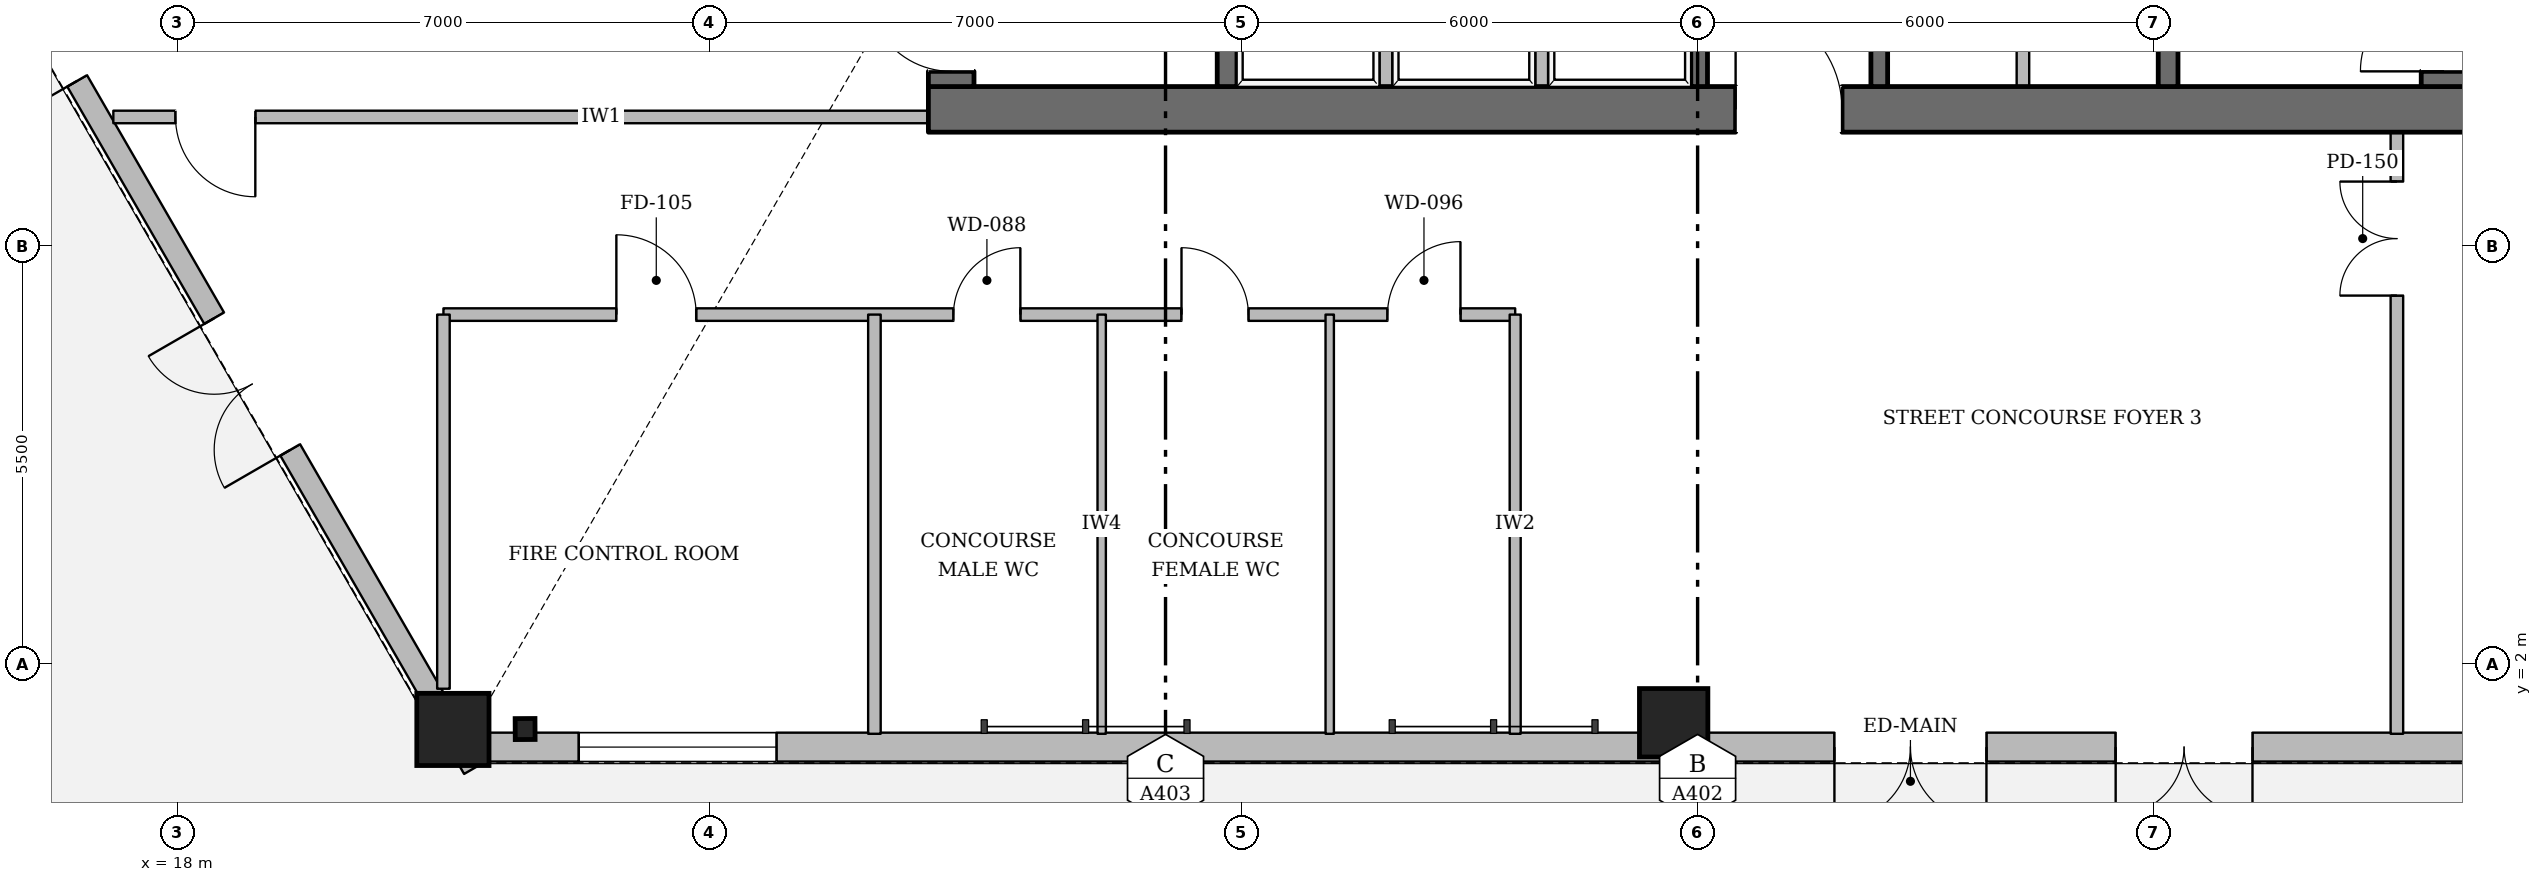
"""IFC4 building model, lengths in metres.
Left out: names, types, materials, properties, quantities, classifications, styles, units other than length and angle.
Written with IfcOpenShell. Run it as: python <this file> out.ifc"""

import sys

from ifc_helpers import new_model, si_unit, direction, frame, frame_2d, origin, origin_2d, place, context, subcontext, project, spatial, rectangle, hollow_rectangle, i_section, extrude, element, fill, save


model = new_model("IFC4")
c1 = context("Model", 3, precision=1e-05, world=origin(), true_north=direction((0.0, 1.0)))
c2 = subcontext(c1, "Body", "Model", "MODEL_VIEW")
j1 = project(units=[si_unit("LENGTHUNIT", "METRE"), si_unit("PLANEANGLEUNIT", "RADIAN")], contexts=[c1])
p1 = place(None, origin())
s1 = spatial("IfcSite", under=j1, at=p1, CompositionType="ELEMENT")
p2 = place(p1, origin())
s2 = spatial("IfcBuilding", under=s1, at=p2, CompositionType="ELEMENT")
p3 = place(p2, origin())
s3 = spatial("IfcBuildingStorey", under=s2, at=p3, CompositionType="ELEMENT", Elevation=0.0)
p4 = place(p3, frame((27.88, 9.3, 0.0), z_axis=(0.0, 0.0, 1.0), x_axis=(1.0, 0.0, 0.0)))
e1 = element("IfcWall", 1, at=p4, inside=s3, PredefinedType="SOLIDWALL", context=c2, shape_type="SweptSolid", body=[
    extrude(rectangle(XDim=20.24, YDim=0.6, at=frame_2d((10.12, 0.0))), origin(), (0.0, 0.0, 1.0), 5.74),
])
p5 = place(p4, frame((10.62, 0.0, 0.0)))
e2 = element("IfcOpeningElement", 2, at=p5, cuts=e1, PredefinedType="OPENING", context=c2, shape_type="SweptSolid", body=[
    extrude(rectangle(XDim=1.4, YDim=2.2, at=frame_2d((0.7, 1.1))), frame((0.0, 0.31, 0.0), z_axis=(0.0, -1.0, 0.0), x_axis=(1.0, 0.0, 0.0)), (0.0, 0.0, 1.0), 0.62),
])
p6 = place(p3, frame((28.18, 9.6, 0.0), z_axis=(0.0, 0.0, 1.0), x_axis=(0.0, 1.0, 0.0)))
e3 = element("IfcWall", 3, at=p6, inside=s3, PredefinedType="SOLIDWALL", context=c2, shape_type="SweptSolid", body=[
    extrude(rectangle(XDim=13.0, YDim=0.6, at=frame_2d((6.5, 0.0))), origin(), (0.0, 0.0, 1.0), 5.74),
])
p7 = place(p6, frame((8.4, 0.0, 0.0)))
e4 = element("IfcOpeningElement", 4, at=p7, cuts=e3, PredefinedType="OPENING", context=c2, shape_type="SweptSolid", body=[
    extrude(rectangle(XDim=0.9, YDim=2.1, at=frame_2d((0.45, 1.05))), frame((0.0, 0.31, 0.0), z_axis=(0.0, -1.0, 0.0), x_axis=(1.0, 0.0, 0.0)), (0.0, 0.0, 1.0), 0.62),
])
p8 = place(p6, frame((0.2, 0.0, 0.0)))
e5 = element("IfcOpeningElement", 5, at=p8, cuts=e3, PredefinedType="OPENING", context=c2, shape_type="SweptSolid", body=[
    extrude(rectangle(XDim=1.1, YDim=2.15, at=frame_2d((0.55, 1.075))), frame((0.0, 0.31, 0.0), z_axis=(0.0, -1.0, 0.0), x_axis=(1.0, 0.0, 0.0)), (0.0, 0.0, 1.0), 0.62),
])
p9 = place(p3, frame((47.82, 9.6, 0.0), z_axis=(0.0, 0.0, 1.0), x_axis=(0.0, 1.0, 0.0)))
e6 = element("IfcWall", 6, at=p9, inside=s3, PredefinedType="SOLIDWALL", context=c2, shape_type="SweptSolid", body=[
    extrude(rectangle(XDim=13.0, YDim=0.6, at=frame_2d((6.5, 0.0))), origin(), (0.0, 0.0, 1.0), 5.74),
])
p10 = place(p9, frame((8.4, 0.0, 0.0)))
e7 = element("IfcOpeningElement", 7, at=p10, cuts=e6, PredefinedType="OPENING", context=c2, shape_type="SweptSolid", body=[
    extrude(rectangle(XDim=0.9, YDim=2.1, at=frame_2d((0.45, 1.05))), frame((0.0, 0.31, 0.0), z_axis=(0.0, -1.0, 0.0), x_axis=(1.0, 0.0, 0.0)), (0.0, 0.0, 1.0), 0.62),
])
p11 = place(p9, frame((0.2, 0.0, 0.0)))
e8 = element("IfcOpeningElement", 8, at=p11, cuts=e6, PredefinedType="OPENING", context=c2, shape_type="SweptSolid", body=[
    extrude(rectangle(XDim=1.1, YDim=2.15, at=frame_2d((0.55, 1.075))), frame((0.0, 0.31, 0.0), z_axis=(0.0, -1.0, 0.0), x_axis=(1.0, 0.0, 0.0)), (0.0, 0.0, 1.0), 0.62),
])
p12 = place(p3, frame((31.81, 9.6, 0.0), z_axis=(0.0, 0.0, 1.0), x_axis=(0.0, 1.0, 0.0)))
e9 = element("IfcWall", 9, at=p12, inside=s3, PredefinedType="SHEAR", context=c2, shape_type="SweptSolid", body=[
    extrude(rectangle(XDim=13.0, YDim=0.26, at=frame_2d((6.5, 0.0))), origin(), (0.0, 0.0, 1.0), 5.74),
])
p13 = place(p12, frame((10.925, 0.0, 0.0)))
e10 = element("IfcOpeningElement", 10, at=p13, cuts=e9, PredefinedType="OPENING", context=c2, shape_type="SweptSolid", body=[
    extrude(rectangle(XDim=1.25, YDim=2.25, at=frame_2d((0.625, 1.125))), frame((0.0, 0.14, 0.0), z_axis=(0.0, -1.0, 0.0), x_axis=(1.0, 0.0, 0.0)), (0.0, 0.0, 1.0), 0.28),
])
p14 = place(p3, frame((44.19, 9.6, 0.0), z_axis=(0.0, 0.0, 1.0), x_axis=(0.0, 1.0, 0.0)))
e11 = element("IfcWall", 11, at=p14, inside=s3, PredefinedType="SHEAR", context=c2, shape_type="SweptSolid", body=[
    extrude(rectangle(XDim=13.0, YDim=0.26, at=frame_2d((6.5, 0.0))), origin(), (0.0, 0.0, 1.0), 5.74),
])
p15 = place(p14, frame((10.925, 0.0, 0.0)))
e12 = element("IfcOpeningElement", 12, at=p15, cuts=e11, PredefinedType="OPENING", context=c2, shape_type="SweptSolid", body=[
    extrude(rectangle(XDim=1.25, YDim=2.25, at=frame_2d((0.625, 1.125))), frame((0.0, 0.14, 0.0), z_axis=(0.0, -1.0, 0.0), x_axis=(1.0, 0.0, 0.0)), (0.0, 0.0, 1.0), 0.28),
])
for number, where, z_axis, x_axis in (
    (13, (38.02, 9.6, 0.0), (0.0, 0.0, 1.0), (0.0, 1.0, 0.0)),
    (14, (40.39, 9.6, 0.0), (0.0, 0.0, 1.0), (0.0, 1.0, 0.0)),
):
    element("IfcWall", number, at=place(p3, frame(where, z_axis=z_axis, x_axis=x_axis)), inside=s3, PredefinedType="SOLIDWALL", context=c2, shape_type="SweptSolid", body=[
        extrude(rectangle(XDim=2.24, YDim=0.22, at=frame_2d((1.12, 0.0))), origin(), (0.0, 0.0, 1.0), 5.74),
    ])
p16 = place(p3, frame((21.625, 1.142, 0.0), z_axis=(0.0, 0.0, 1.0), x_axis=(1.0, 0.0, 0.0)))
e15 = element("IfcColumn", 15, at=p16, inside=s3, PredefinedType="COLUMN", context=c2, shape_type="SweptSolid", body=[
    extrude(hollow_rectangle(XDim=0.95, YDim=0.95, WallThickness=0.04, at=origin_2d()), origin(), (0.0, 0.0, 1.0), 5.74),
])
p17 = place(p3, frame((37.685, 1.23, 0.0), z_axis=(0.0, 0.0, 1.0), x_axis=(1.0, 0.0, 0.0)))
e16 = element("IfcColumn", 16, at=p17, inside=s3, PredefinedType="COLUMN", context=c2, shape_type="SweptSolid", body=[
    extrude(hollow_rectangle(XDim=0.9, YDim=0.9, WallThickness=0.038, at=origin_2d()), origin(), (0.0, 0.0, 1.0), 5.74),
])
p18 = place(p3, frame((22.574, 1.148, 0.0), z_axis=(0.0, 0.0, 1.0), x_axis=(0.999985363169, 0.005410494284, 0.0)))
e17 = element("IfcColumn", 17, at=p18, inside=s3, PredefinedType="PILASTER", context=c2, shape_type="SweptSolid", body=[
    extrude(i_section(OverallWidth=0.261, OverallDepth=0.276, WebThickness=0.015, FlangeThickness=0.025, at=origin_2d()), origin(), (0.0, 0.0, 1.0), 5.74),
])
p19 = place(p3, frame((21.902, 0.632, 0.0), z_axis=(0.0, 0.0, 1.0), x_axis=(-0.500005062714, 0.866022480806, 0.0)))
e18 = element("IfcWall", 18, at=p19, inside=s3, PredefinedType="STANDARD", context=c2, shape_type="SweptSolid", body=[
    extrude(rectangle(XDim=17.448, YDim=0.3, at=frame_2d((8.724, 0.0))), origin(), (0.0, 0.0, 1.0), 3.43),
])
p20 = place(p19, frame((10.442, 0.0, 0.0)))
e19 = element("IfcOpeningElement", 19, at=p20, cuts=e18, PredefinedType="OPENING", context=c2, shape_type="SweptSolid", body=[
    extrude(rectangle(XDim=1.8, YDim=2.25, at=frame_2d((0.9, 1.125))), frame((0.0, 0.16, 0.0), z_axis=(0.0, -1.0, 0.0), x_axis=(1.0, 0.0, 0.0)), (0.0, 0.0, 1.0), 0.32),
])
p21 = place(p19, frame((4.836, 0.0, 0.0)))
e20 = element("IfcOpeningElement", 20, at=p21, cuts=e18, PredefinedType="OPENING", context=c2, shape_type="SweptSolid", body=[
    extrude(rectangle(XDim=2.0, YDim=2.6, at=frame_2d((1.0, 1.3))), frame((0.0, 0.16, 0.0), z_axis=(0.0, -1.0, 0.0), x_axis=(1.0, 0.0, 0.0)), (0.0, 0.0, 1.0), 0.32),
])
p22 = place(p3, frame((54.58, 0.91, 0.0), z_axis=(0.0, 0.0, 1.0), x_axis=(-1.0, 0.0, 0.0)))
e21 = element("IfcWall", 21, at=p22, inside=s3, PredefinedType="STANDARD", context=c2, shape_type="SweptSolid", body=[
    extrude(rectangle(XDim=33.16, YDim=0.38, at=frame_2d((16.58, 0.0))), origin(), (0.0, 0.0, 1.0), 3.43),
])
p23 = place(p22, frame((9.28, 0.0, 0.0)))
e22 = element("IfcOpeningElement", 22, at=p23, cuts=e21, PredefinedType="OPENING", context=c2, shape_type="SweptSolid", body=[
    extrude(rectangle(XDim=1.8, YDim=2.25, at=frame_2d((0.9, 1.125))), frame((0.0, 0.2, 0.0), z_axis=(0.0, -1.0, 0.0), x_axis=(1.0, 0.0, 0.0)), (0.0, 0.0, 1.0), 0.4),
])
p24 = place(p22, frame((12.78, 0.0, 0.0)))
e23 = element("IfcOpeningElement", 23, at=p24, cuts=e21, PredefinedType="OPENING", context=c2, shape_type="SweptSolid", body=[
    extrude(rectangle(XDim=2.0, YDim=2.6, at=frame_2d((1.0, 1.3))), frame((0.0, 0.2, 0.0), z_axis=(0.0, -1.0, 0.0), x_axis=(1.0, 0.0, 0.0)), (0.0, 0.0, 1.0), 0.4),
])
p25 = place(p22, frame((28.699, 0.0, 0.55)))
e24 = element("IfcOpeningElement", 24, at=p25, cuts=e21, PredefinedType="OPENING", context=c2, shape_type="SweptSolid", body=[
    extrude(rectangle(XDim=2.6, YDim=2.55, at=frame_2d((1.3, 1.275))), frame((0.0, 0.2, 0.0), z_axis=(0.0, -1.0, 0.0), x_axis=(1.0, 0.0, 0.0)), (0.0, 0.0, 1.0), 0.4),
])
p26 = place(p22, frame((1.861, 0.0, 0.55)))
e25 = element("IfcOpeningElement", 25, at=p26, cuts=e21, PredefinedType="OPENING", context=c2, shape_type="SweptSolid", body=[
    extrude(rectangle(XDim=2.6, YDim=2.55, at=frame_2d((1.3, 1.275))), frame((0.0, 0.2, 0.0), z_axis=(0.0, -1.0, 0.0), x_axis=(1.0, 0.0, 0.0)), (0.0, 0.0, 1.0), 0.4),
])
for number, where, z_axis, x_axis in (
    (26, (33.9, 9.6, 0.0), (0.0, 0.0, 1.0), (0.0, 1.0, 0.0)),
    (27, (35.95, 9.6, 0.0), (0.0, 0.0, 1.0), (0.0, 1.0, 0.0)),
    (28, (42.28, 9.6, 0.0), (0.0, 0.0, 1.0), (0.0, 1.0, 0.0)),
):
    element("IfcWall", number, at=place(p3, frame(where, z_axis=z_axis, x_axis=x_axis)), inside=s3, PredefinedType="PARTITIONING", context=c2, shape_type="SweptSolid", body=[
        extrude(rectangle(XDim=2.24, YDim=0.165, at=frame_2d((1.12, 0.0))), origin(), (0.0, 0.0, 1.0), 5.74),
    ])
p27 = place(p3, frame((27.88, 9.2, 0.0), z_axis=(0.0, 0.0, 1.0), x_axis=(-1.0, 0.0, 0.0)))
e29 = element("IfcWall", 29, at=p27, inside=s3, PredefinedType="PARTITIONING", context=c2, shape_type="SweptSolid", body=[
    extrude(rectangle(XDim=10.723, YDim=0.165, at=frame_2d((5.361, 0.0))), origin(), (0.0, 0.0, 1.0), 5.74),
])
p28 = place(p27, frame((8.855, 0.0, 0.0)))
e30 = element("IfcOpeningElement", 30, at=p28, cuts=e29, PredefinedType="OPENING", context=c2, shape_type="SweptSolid", body=[
    extrude(rectangle(XDim=1.05, YDim=2.15, at=frame_2d((0.525, 1.075))), frame((0.0, 0.093, 0.0), z_axis=(0.0, -1.0, 0.0), x_axis=(1.0, 0.0, 0.0)), (0.0, 0.0, 1.0), 0.185),
])
p29 = place(p3, frame((21.5, 6.6, 0.0), z_axis=(0.0, 0.0, 1.0), x_axis=(1.0, 0.0, 0.0)))
e31 = element("IfcWall", 31, at=p29, inside=s3, PredefinedType="PARTITIONING", context=c2, shape_type="SweptSolid", body=[
    extrude(rectangle(XDim=14.1, YDim=0.165, at=frame_2d((7.05, 0.0))), origin(), (0.0, 0.0, 1.0), 5.428),
])
p30 = place(p29, frame((2.275, 0.0, 0.0)))
e32 = element("IfcOpeningElement", 32, at=p30, cuts=e31, PredefinedType="OPENING", context=c2, shape_type="SweptSolid", body=[
    extrude(rectangle(XDim=1.05, YDim=2.15, at=frame_2d((0.525, 1.075))), frame((0.0, 0.093, 0.0), z_axis=(0.0, -1.0, 0.0), x_axis=(1.0, 0.0, 0.0)), (0.0, 0.0, 1.0), 0.185),
])
p31 = place(p29, frame((6.71, 0.0, 0.0)))
e33 = element("IfcOpeningElement", 33, at=p31, cuts=e31, PredefinedType="OPENING", context=c2, shape_type="SweptSolid", body=[
    extrude(rectangle(XDim=0.88, YDim=2.1, at=frame_2d((0.44, 1.05))), frame((0.0, 0.093, 0.0), z_axis=(0.0, -1.0, 0.0), x_axis=(1.0, 0.0, 0.0)), (0.0, 0.0, 1.0), 0.185),
])
p32 = place(p29, frame((9.71, 0.0, 0.0)))
e34 = element("IfcOpeningElement", 34, at=p32, cuts=e31, PredefinedType="OPENING", context=c2, shape_type="SweptSolid", body=[
    extrude(rectangle(XDim=0.88, YDim=2.1, at=frame_2d((0.44, 1.05))), frame((0.0, 0.093, 0.0), z_axis=(0.0, -1.0, 0.0), x_axis=(1.0, 0.0, 0.0)), (0.0, 0.0, 1.0), 0.185),
])
p33 = place(p29, frame((12.42, 0.0, 0.0)))
e35 = element("IfcOpeningElement", 35, at=p33, cuts=e31, PredefinedType="OPENING", context=c2, shape_type="SweptSolid", body=[
    extrude(rectangle(XDim=0.96, YDim=2.1, at=frame_2d((0.48, 1.05))), frame((0.0, 0.093, 0.0), z_axis=(0.0, -1.0, 0.0), x_axis=(1.0, 0.0, 0.0)), (0.0, 0.0, 1.0), 0.185),
])
p34 = place(p3, frame((21.5, 1.678, 0.0), z_axis=(0.0, 0.0, 1.0), x_axis=(0.0, 1.0, 0.0)))
e36 = element("IfcWall", 36, at=p34, inside=s3, PredefinedType="PARTITIONING", context=c2, shape_type="SweptSolid", body=[
    extrude(rectangle(XDim=4.922, YDim=0.165, at=frame_2d((2.461, 0.0))), origin(), (0.0, 0.0, 1.0), 4.475),
])
p35 = place(p3, frame((27.17, 1.085, 0.0), z_axis=(0.0, 0.0, 1.0), x_axis=(0.0, 1.0, 0.0)))
e37 = element("IfcWall", 37, at=p35, inside=s3, PredefinedType="PARTITIONING", context=c2, shape_type="SweptSolid", body=[
    extrude(rectangle(XDim=5.515, YDim=0.165, at=frame_2d((2.758, 0.0))), origin(), (0.0, 0.0, 1.0), 5.74),
])
for number, where, z_axis, x_axis in (
    (38, (30.16, 1.085, 0.0), (0.0, 0.0, 1.0), (0.0, 1.0, 0.0)),
    (39, (33.16, 1.085, 0.0), (0.0, 0.0, 1.0), (0.0, 1.0, 0.0)),
):
    element("IfcWall", number, at=place(p3, frame(where, z_axis=z_axis, x_axis=x_axis)), inside=s3, PredefinedType="PLUMBINGWALL", context=c2, shape_type="SweptSolid", body=[
        extrude(rectangle(XDim=5.515, YDim=0.11, at=frame_2d((2.758, 0.0))), origin(), (0.0, 0.0, 1.0), 5.74),
    ])
p36 = place(p3, frame((35.6, 1.085, 0.0), z_axis=(0.0, 0.0, 1.0), x_axis=(0.0, 1.0, 0.0)))
e40 = element("IfcWall", 40, at=p36, inside=s3, PredefinedType="PARTITIONING", context=c2, shape_type="SweptSolid", body=[
    extrude(rectangle(XDim=5.515, YDim=0.145, at=frame_2d((2.758, 0.0))), origin(), (0.0, 0.0, 1.0), 5.74),
])
p37 = place(p3, frame((47.2, 1.085, 0.0), z_axis=(0.0, 0.0, 1.0), x_axis=(0.0, 1.0, 0.0)))
e41 = element("IfcWall", 41, at=p37, inside=s3, PredefinedType="PARTITIONING", context=c2, shape_type="SweptSolid", body=[
    extrude(rectangle(XDim=8.035, YDim=0.165, at=frame_2d((4.018, 0.0))), origin(), (0.0, 0.0, 1.0), 5.74),
])
p38 = place(p37, frame((5.765, 0.0, 0.0)))
e42 = element("IfcOpeningElement", 42, at=p38, cuts=e41, PredefinedType="OPENING", context=c2, shape_type="SweptSolid", body=[
    extrude(rectangle(XDim=1.5, YDim=2.25, at=frame_2d((0.75, 1.125))), frame((0.0, 0.093, 0.0), z_axis=(0.0, -1.0, 0.0), x_axis=(1.0, 0.0, 0.0)), (0.0, 0.0, 1.0), 0.185),
])
p39 = place(p20, origin())
e43 = element("IfcDoor", 43, at=p39, inside=s3, OperationType="DOUBLE_DOOR_SINGLE_SWING", PredefinedType="DOOR", context=c2, shape_type="SweptSolid", body=[
    extrude(rectangle(XDim=1.8, YDim=2.25, at=frame_2d((0.9, 1.125))), frame((0.0, 0.025, 0.0), z_axis=(0.0, -1.0, 0.0), x_axis=(1.0, 0.0, 0.0)), (0.0, 0.0, 1.0), 0.05),
])
fill(e19, e43)
p40 = place(p23, origin())
e44 = element("IfcDoor", 44, at=p40, inside=s3, OperationType="DOUBLE_DOOR_SINGLE_SWING", PredefinedType="DOOR", context=c2, shape_type="SweptSolid", body=[
    extrude(rectangle(XDim=1.8, YDim=2.25, at=frame_2d((0.9, 1.125))), frame((0.0, 0.025, 0.0), z_axis=(0.0, -1.0, 0.0), x_axis=(1.0, 0.0, 0.0)), (0.0, 0.0, 1.0), 0.05),
])
fill(e22, e44)
p41 = place(p24, origin())
e45 = element("IfcDoor", 45, at=p41, inside=s3, OperationType="DOUBLE_DOOR_SINGLE_SWING", PredefinedType="DOOR", context=c2, shape_type="SweptSolid", body=[
    extrude(rectangle(XDim=2.0, YDim=2.6, at=frame_2d((1.0, 1.3))), frame((0.0, 0.025, 0.0), z_axis=(0.0, -1.0, 0.0), x_axis=(1.0, 0.0, 0.0)), (0.0, 0.0, 1.0), 0.05),
])
fill(e23, e45)
p42 = place(p21, origin())
e46 = element("IfcDoor", 46, at=p42, inside=s3, OperationType="DOUBLE_DOOR_SINGLE_SWING", PredefinedType="DOOR", context=c2, shape_type="SweptSolid", body=[
    extrude(rectangle(XDim=2.0, YDim=2.6, at=frame_2d((1.0, 1.3))), frame((0.0, 0.025, 0.0), z_axis=(0.0, -1.0, 0.0), x_axis=(1.0, 0.0, 0.0)), (0.0, 0.0, 1.0), 0.05),
])
fill(e20, e46)
p43 = place(p25, origin())
e47 = element("IfcWindow", 47, at=p43, inside=s3, PartitioningType="SINGLE_PANEL", PredefinedType="WINDOW", context=c2, shape_type="SweptSolid", body=[
    extrude(rectangle(XDim=2.6, YDim=2.55, at=frame_2d((1.3, 1.275))), frame((0.0, 0.03, 0.0), z_axis=(0.0, -1.0, 0.0), x_axis=(1.0, 0.0, 0.0)), (0.0, 0.0, 1.0), 0.06),
])
fill(e24, e47)
p44 = place(p5, origin())
e48 = element("IfcDoor", 48, at=p44, inside=s3, OperationType="SINGLE_SWING_LEFT", PredefinedType="DOOR", context=c2, shape_type="SweptSolid", body=[
    extrude(rectangle(XDim=1.4, YDim=2.2, at=frame_2d((0.7, 1.1))), frame((0.0, 0.025, 0.0), z_axis=(0.0, -1.0, 0.0), x_axis=(1.0, 0.0, 0.0)), (0.0, 0.0, 1.0), 0.05),
])
fill(e2, e48)
p45 = place(p8, origin())
e49 = element("IfcDoor", 49, at=p45, inside=s3, OperationType="SINGLE_SWING_RIGHT", PredefinedType="DOOR", context=c2, shape_type="SweptSolid", body=[
    extrude(rectangle(XDim=1.1, YDim=2.15, at=frame_2d((0.55, 1.075))), frame((0.0, 0.025, 0.0), z_axis=(0.0, -1.0, 0.0), x_axis=(1.0, 0.0, 0.0)), (0.0, 0.0, 1.0), 0.05),
])
fill(e5, e49)
p46 = place(p11, origin())
e50 = element("IfcDoor", 50, at=p46, inside=s3, OperationType="SINGLE_SWING_LEFT", PredefinedType="DOOR", context=c2, shape_type="SweptSolid", body=[
    extrude(rectangle(XDim=1.1, YDim=2.15, at=frame_2d((0.55, 1.075))), frame((0.0, 0.025, 0.0), z_axis=(0.0, -1.0, 0.0), x_axis=(1.0, 0.0, 0.0)), (0.0, 0.0, 1.0), 0.05),
])
fill(e8, e50)
p47 = place(p30, origin())
e51 = element("IfcDoor", 51, at=p47, inside=s3, OperationType="SINGLE_SWING_LEFT", PredefinedType="DOOR", context=c2, shape_type="SweptSolid", body=[
    extrude(rectangle(XDim=1.05, YDim=2.15, at=frame_2d((0.525, 1.075))), frame((0.0, 0.025, 0.0), z_axis=(0.0, -1.0, 0.0), x_axis=(1.0, 0.0, 0.0)), (0.0, 0.0, 1.0), 0.05),
])
fill(e32, e51)
p48 = place(p31, origin())
e52 = element("IfcDoor", 52, at=p48, inside=s3, OperationType="SINGLE_SWING_RIGHT", PredefinedType="DOOR", context=c2, shape_type="SweptSolid", body=[
    extrude(rectangle(XDim=0.88, YDim=2.1, at=frame_2d((0.44, 1.05))), frame((0.0, 0.025, 0.0), z_axis=(0.0, -1.0, 0.0), x_axis=(1.0, 0.0, 0.0)), (0.0, 0.0, 1.0), 0.05),
])
fill(e33, e52)
p49 = place(p32, origin())
e53 = element("IfcDoor", 53, at=p49, inside=s3, OperationType="SINGLE_SWING_LEFT", PredefinedType="DOOR", context=c2, shape_type="SweptSolid", body=[
    extrude(rectangle(XDim=0.88, YDim=2.1, at=frame_2d((0.44, 1.05))), frame((0.0, 0.025, 0.0), z_axis=(0.0, -1.0, 0.0), x_axis=(1.0, 0.0, 0.0)), (0.0, 0.0, 1.0), 0.05),
])
fill(e34, e53)
p50 = place(p33, origin())
e54 = element("IfcDoor", 54, at=p50, inside=s3, OperationType="SINGLE_SWING_RIGHT", PredefinedType="DOOR", context=c2, shape_type="SweptSolid", body=[
    extrude(rectangle(XDim=0.96, YDim=2.1, at=frame_2d((0.48, 1.05))), frame((0.0, 0.025, 0.0), z_axis=(0.0, -1.0, 0.0), x_axis=(1.0, 0.0, 0.0)), (0.0, 0.0, 1.0), 0.05),
])
fill(e35, e54)
p51 = place(p38, origin())
e55 = element("IfcDoor", 55, at=p51, inside=s3, OperationType="DOUBLE_DOOR_SINGLE_SWING", PredefinedType="DOOR", context=c2, shape_type="SweptSolid", body=[
    extrude(rectangle(XDim=1.5, YDim=2.25, at=frame_2d((0.75, 1.125))), frame((0.0, 0.025, 0.0), z_axis=(0.0, -1.0, 0.0), x_axis=(1.0, 0.0, 0.0)), (0.0, 0.0, 1.0), 0.05),
])
fill(e42, e55)
p52 = place(p28, origin())
e56 = element("IfcDoor", 56, at=p52, inside=s3, OperationType="SINGLE_SWING_LEFT", PredefinedType="DOOR", context=c2, shape_type="SweptSolid", body=[
    extrude(rectangle(XDim=1.05, YDim=2.15, at=frame_2d((0.525, 1.075))), frame((0.0, 0.025, 0.0), z_axis=(0.0, -1.0, 0.0), x_axis=(1.0, 0.0, 0.0)), (0.0, 0.0, 1.0), 0.05),
])
fill(e30, e56)
save(model, sys.argv[1])
